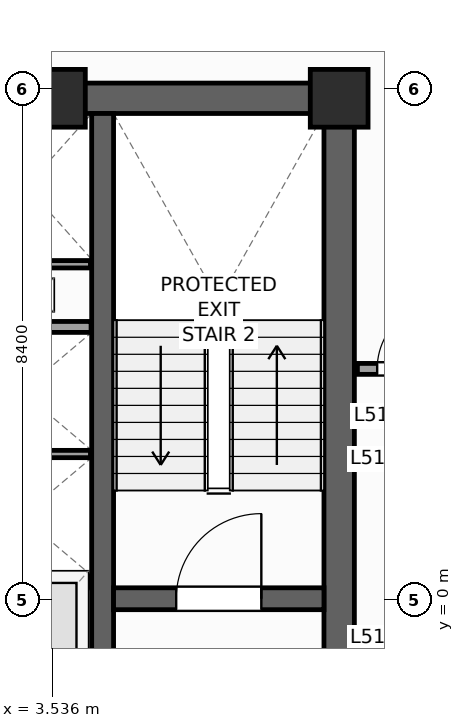
"""IFC4 building model, lengths in metres.
Left out: names, types, materials, properties, quantities, classifications, styles, units other than length and angle.
Written with IfcOpenShell. Run it as: python <this file> out.ifc"""

import sys

from ifc_helpers import new_model, si_unit, direction, frame, frame_2d, origin, origin_2d, place, context, subcontext, project, spatial, rectangle, extrude, source, transform, mapped, element, fill, save


model = new_model("IFC4")
c1 = context("Model", 3, precision=1e-05, world=origin(), true_north=direction((0.0, 1.0)))
c2 = subcontext(c1, "Body", "Model", "MODEL_VIEW")
j1 = project(units=[si_unit("LENGTHUNIT", "METRE"), si_unit("PLANEANGLEUNIT", "RADIAN")], contexts=[c1])
p1 = place(None, origin())
s1 = spatial("IfcSite", under=j1, at=p1, CompositionType="ELEMENT")
p2 = place(p1, origin())
s2 = spatial("IfcBuilding", under=s1, at=p2, CompositionType="ELEMENT")
p3 = place(p2, frame((0.0, 0.0, 213.4)))
s3 = spatial("IfcBuildingStorey", under=s2, at=p3, CompositionType="ELEMENT", Elevation=213.4)
p4 = place(p3, frame((-8.5, 8.25, 0.0), z_axis=(0.0, 0.0, 1.0), x_axis=(1.0, 0.0, 0.0)))
e1 = element("IfcWall", 1, at=p4, inside=s3, PredefinedType="SHEAR", context=c2, shape_type="SweptSolid", body=[
    extrude(rectangle(XDim=17.0, YDim=0.5, at=frame_2d((8.5, 0.0))), origin(), (0.0, 0.0, 1.0), 3.9),
])
p5 = place(p3, frame((8.25, -8.0, 0.0), z_axis=(0.0, 0.0, 1.0), x_axis=(0.0, 1.0, 0.0)))
e2 = element("IfcWall", 2, at=p5, inside=s3, PredefinedType="SHEAR", context=c2, shape_type="SweptSolid", body=[
    extrude(rectangle(XDim=16.0, YDim=0.5, at=frame_2d((8.0, 0.0))), origin(), (0.0, 0.0, 1.0), 3.9),
])
p6 = place(p5, frame((4.69, 0.0, 0.0)))
e3 = element("IfcOpeningElement", 3, at=p6, cuts=e2, PredefinedType="OPENING", context=c2, shape_type="SweptSolid", body=[
    extrude(rectangle(XDim=1.3, YDim=2.2, at=frame_2d((0.65, 1.1))), frame((0.0, 0.26, 0.0), z_axis=(0.0, -1.0, 0.0), x_axis=(1.0, 0.0, 0.0)), (0.0, 0.0, 1.0), 0.52),
])
p7 = place(p3, frame((4.36, -8.0, 0.0), z_axis=(0.0, 0.0, 1.0), x_axis=(0.0, 1.0, 0.0)))
e4 = element("IfcWall", 4, at=p7, inside=s3, PredefinedType="SHEAR", context=c2, shape_type="SweptSolid", body=[
    extrude(rectangle(XDim=16.0, YDim=0.36, at=frame_2d((8.0, 0.0))), origin(), (0.0, 0.0, 1.0), 3.9),
])
p8 = place(p3, frame((4.54, 0.02, 0.0), z_axis=(0.0, 0.0, 1.0), x_axis=(1.0, 0.0, 0.0)))
e5 = element("IfcWall", 5, at=p8, inside=s3, PredefinedType="SHEAR", context=c2, shape_type="SweptSolid", body=[
    extrude(rectangle(XDim=3.46, YDim=0.36, at=frame_2d((1.73, 0.0))), origin(), (0.0, 0.0, 1.0), 3.9),
])
p9 = place(p8, frame((1.03, 0.0, 0.0)))
e6 = element("IfcOpeningElement", 6, at=p9, cuts=e5, PredefinedType="OPENING", context=c2, shape_type="SweptSolid", body=[
    extrude(rectangle(XDim=1.4, YDim=2.2, at=frame_2d((0.7, 1.1))), frame((0.0, 0.19, 0.0), z_axis=(0.0, -1.0, 0.0), x_axis=(1.0, 0.0, 0.0)), (0.0, 0.0, 1.0), 0.38),
])
m1 = source(origin(), c2, "Body", "SweptSolid", [
    extrude(rectangle(XDim=0.95, YDim=0.95, at=origin_2d()), origin(), (0.0, 0.0, 1.0), 3.9),
])
for number, where, z_axis, x_axis in (
    (7, (8.25, 8.25, 0.0), (0.0, 0.0, 1.0), (1.0, 0.0, 0.0)),
    (8, (3.6, 8.25, 0.0), (0.0, 0.0, 1.0), (1.0, 0.0, 0.0)),
):
    element("IfcColumn", number, at=place(p3, frame(where, z_axis=z_axis, x_axis=x_axis)), inside=s3, PredefinedType="PILASTER", context=c2, shape_type="MappedRepresentation", body=[
        mapped(m1, transform((0.0, 0.0, 0.0), scale=1.0)),
    ])
p10 = place(p3, frame((6.733, -29.154, 0.0), z_axis=(0.0, 0.0, 1.0), x_axis=(0.629325378072, 0.77714192302, 0.0)))
e9 = element("IfcWall", 9, at=p10, inside=s3, PredefinedType="STANDARD", context=c2, shape_type="SweptSolid", body=[
    extrude(rectangle(XDim=36.84, YDim=0.34, at=frame_2d((18.42, 0.0))), origin(), (0.0, 0.0, 1.0), 2.96),
])
p11 = place(p10, frame((12.295, 0.0, 0.0)))
e10 = element("IfcOpeningElement", 10, at=p11, cuts=e9, PredefinedType="OPENING", context=c2, shape_type="SweptSolid", body=[
    extrude(rectangle(XDim=1.05, YDim=2.25, at=frame_2d((0.525, 1.125))), frame((0.0, 0.18, 0.0), z_axis=(0.0, -1.0, 0.0), x_axis=(1.0, 0.0, 0.0)), (0.0, 0.0, 1.0), 0.36),
])
p12 = place(p10, frame((3.721, 0.0, 0.48)))
e11 = element("IfcOpeningElement", 11, at=p12, cuts=e9, PredefinedType="OPENING", context=c2, shape_type="SweptSolid", body=[
    extrude(rectangle(XDim=1.4, YDim=2.4, at=frame_2d((0.7, 1.2))), frame((0.0, 0.18, 0.0), z_axis=(0.0, -1.0, 0.0), x_axis=(1.0, 0.0, 0.0)), (0.0, 0.0, 1.0), 0.36),
])
p13 = place(p10, frame((7.559, 0.0, 0.58)))
e12 = element("IfcOpeningElement", 12, at=p13, cuts=e9, PredefinedType="OPENING", context=c2, shape_type="SweptSolid", body=[
    extrude(rectangle(XDim=1.75, YDim=2.3, at=frame_2d((0.875, 1.15))), frame((0.0, 0.18, 0.0), z_axis=(0.0, -1.0, 0.0), x_axis=(1.0, 0.0, 0.0)), (0.0, 0.0, 1.0), 0.36),
])
p14 = place(p10, frame((16.058, 0.0, 0.58)))
e13 = element("IfcOpeningElement", 13, at=p14, cuts=e9, PredefinedType="OPENING", context=c2, shape_type="SweptSolid", body=[
    extrude(rectangle(XDim=1.75, YDim=2.3, at=frame_2d((0.875, 1.15))), frame((0.0, 0.18, 0.0), z_axis=(0.0, -1.0, 0.0), x_axis=(1.0, 0.0, 0.0)), (0.0, 0.0, 1.0), 0.36),
])
p15 = place(p10, frame((24.176, 0.0, 0.58)))
e14 = element("IfcOpeningElement", 14, at=p15, cuts=e9, PredefinedType="OPENING", context=c2, shape_type="SweptSolid", body=[
    extrude(rectangle(XDim=1.75, YDim=2.3, at=frame_2d((0.875, 1.15))), frame((0.0, 0.18, 0.0), z_axis=(0.0, -1.0, 0.0), x_axis=(1.0, 0.0, 0.0)), (0.0, 0.0, 1.0), 0.36),
])
p16 = place(p10, frame((30.982, 0.0, 0.48)))
e15 = element("IfcOpeningElement", 15, at=p16, cuts=e9, PredefinedType="OPENING", context=c2, shape_type="SweptSolid", body=[
    extrude(rectangle(XDim=1.4, YDim=2.4, at=frame_2d((0.7, 1.2))), frame((0.0, 0.18, 0.0), z_axis=(0.0, -1.0, 0.0), x_axis=(1.0, 0.0, 0.0)), (0.0, 0.0, 1.0), 0.36),
])
p17 = place(p3, frame((29.154, 6.733, 0.0), z_axis=(0.0, 0.0, 1.0), x_axis=(-0.77714192302, 0.629325378072, 0.0)))
e16 = element("IfcWall", 16, at=p17, inside=s3, PredefinedType="STANDARD", context=c2, shape_type="SweptSolid", body=[
    extrude(rectangle(XDim=36.84, YDim=0.34, at=frame_2d((18.42, 0.0))), origin(), (0.0, 0.0, 1.0), 2.96),
])
p18 = place(p17, frame((3.721, 0.0, 0.48)))
e17 = element("IfcOpeningElement", 17, at=p18, cuts=e16, PredefinedType="OPENING", context=c2, shape_type="SweptSolid", body=[
    extrude(rectangle(XDim=1.4, YDim=2.4, at=frame_2d((0.7, 1.2))), frame((0.0, 0.18, 0.0), z_axis=(0.0, -1.0, 0.0), x_axis=(1.0, 0.0, 0.0)), (0.0, 0.0, 1.0), 0.36),
])
p19 = place(p17, frame((9.809, 0.0, 0.58)))
e18 = element("IfcOpeningElement", 18, at=p19, cuts=e16, PredefinedType="OPENING", context=c2, shape_type="SweptSolid", body=[
    extrude(rectangle(XDim=1.75, YDim=2.3, at=frame_2d((0.875, 1.15))), frame((0.0, 0.18, 0.0), z_axis=(0.0, -1.0, 0.0), x_axis=(1.0, 0.0, 0.0)), (0.0, 0.0, 1.0), 0.36),
])
p20 = place(p17, frame((16.058, 0.0, 0.58)))
e19 = element("IfcOpeningElement", 19, at=p20, cuts=e16, PredefinedType="OPENING", context=c2, shape_type="SweptSolid", body=[
    extrude(rectangle(XDim=1.75, YDim=2.3, at=frame_2d((0.875, 1.15))), frame((0.0, 0.18, 0.0), z_axis=(0.0, -1.0, 0.0), x_axis=(1.0, 0.0, 0.0)), (0.0, 0.0, 1.0), 0.36),
])
p21 = place(p17, frame((24.176, 0.0, 0.58)))
e20 = element("IfcOpeningElement", 20, at=p21, cuts=e16, PredefinedType="OPENING", context=c2, shape_type="SweptSolid", body=[
    extrude(rectangle(XDim=1.75, YDim=2.3, at=frame_2d((0.875, 1.15))), frame((0.0, 0.18, 0.0), z_axis=(0.0, -1.0, 0.0), x_axis=(1.0, 0.0, 0.0)), (0.0, 0.0, 1.0), 0.36),
])
p22 = place(p17, frame((30.982, 0.0, 0.48)))
e21 = element("IfcOpeningElement", 21, at=p22, cuts=e16, PredefinedType="OPENING", context=c2, shape_type="SweptSolid", body=[
    extrude(rectangle(XDim=1.4, YDim=2.4, at=frame_2d((0.7, 1.2))), frame((0.0, 0.18, 0.0), z_axis=(0.0, -1.0, 0.0), x_axis=(1.0, 0.0, 0.0)), (0.0, 0.0, 1.0), 0.36),
])
for number, where, z_axis, x_axis in (
    (22, (1.89, 0.3, 0.0), (0.0, 0.0, 1.0), (1.0, 0.0, 0.0)),
    (23, (1.89, 4.49, 0.0), (0.0, 0.0, 1.0), (1.0, 0.0, 0.0)),
):
    element("IfcWall", number, at=place(p3, frame(where, z_axis=z_axis, x_axis=x_axis)), inside=s3, PredefinedType="PARTITIONING", context=c2, shape_type="SweptSolid", body=[
        extrude(rectangle(XDim=2.28, YDim=0.18, at=frame_2d((1.14, 0.0))), origin(), (0.0, 0.0, 1.0), 3.66),
    ])
p23 = place(p3, frame((1.9, 2.4, 0.0), z_axis=(0.0, 0.0, 1.0), x_axis=(1.0, 0.0, 0.0)))
e24 = element("IfcWall", 24, at=p23, inside=s3, PredefinedType="PARTITIONING", context=c2, shape_type="SweptSolid", body=[
    extrude(rectangle(XDim=2.26, YDim=0.12, at=frame_2d((1.13, 0.0))), origin(), (0.0, 0.0, 1.0), 3.66),
])
p24 = place(p3, frame((2.06, 5.52, 0.0), z_axis=(0.0, 0.0, 1.0), x_axis=(1.0, 0.0, 0.0)))
e25 = element("IfcWall", 25, at=p24, inside=s3, PredefinedType="PARTITIONING", context=c2, shape_type="SweptSolid", body=[
    extrude(rectangle(XDim=2.1, YDim=0.12, at=frame_2d((1.05, 0.0))), origin(), (0.0, 0.0, 1.0), 3.66),
])
p25 = place(p3, frame((8.55, 3.8, 0.0), z_axis=(0.0, 0.0, 1.0), x_axis=(1.0, 0.0, 0.0)))
e26 = element("IfcWall", 26, at=p25, inside=s3, PredefinedType="PARTITIONING", context=c2, shape_type="SweptSolid", body=[
    extrude(rectangle(XDim=1.75, YDim=0.18, at=frame_2d((0.875, 0.0))), origin(), (0.0, 0.0, 1.0), 3.66),
])
p26 = place(p25, frame((0.325, 0.0, 0.0)))
e27 = element("IfcOpeningElement", 27, at=p26, cuts=e26, PredefinedType="OPENING", context=c2, shape_type="SweptSolid", body=[
    extrude(rectangle(XDim=1.1, YDim=2.2, at=frame_2d((0.55, 1.1))), frame((0.0, 0.1, 0.0), z_axis=(0.0, -1.0, 0.0), x_axis=(1.0, 0.0, 0.0)), (0.0, 0.0, 1.0), 0.2),
])
m2 = source(origin(), c2, "Body", "SweptSolid", [
    extrude(rectangle(XDim=1.4, YDim=2.2, at=frame_2d((0.7, 1.1))), frame((0.0, 0.025, 0.0), z_axis=(0.0, -1.0, 0.0), x_axis=(1.0, 0.0, 0.0)), (0.0, 0.0, 1.0), 0.05),
])
p27 = place(p9, origin())
e28 = element("IfcDoor", 28, at=p27, inside=s3, OperationType="SINGLE_SWING_RIGHT", PredefinedType="DOOR", context=c2, shape_type="MappedRepresentation", body=[
    mapped(m2, transform((0.0, 0.0, 0.0), scale=1.0)),
])
fill(e6, e28)
m3 = source(origin(), c2, "Body", "SweptSolid", [
    extrude(rectangle(XDim=1.1, YDim=2.2, at=frame_2d((0.55, 1.1))), frame((0.0, 0.025, 0.0), z_axis=(0.0, -1.0, 0.0), x_axis=(1.0, 0.0, 0.0)), (0.0, 0.0, 1.0), 0.05),
])
p28 = place(p26, origin())
e29 = element("IfcDoor", 29, at=p28, inside=s3, OperationType="SINGLE_SWING_RIGHT", PredefinedType="DOOR", context=c2, shape_type="MappedRepresentation", body=[
    mapped(m3, transform((0.0, 0.0, 0.0), scale=1.0)),
])
fill(e27, e29)
save(model, sys.argv[1])
